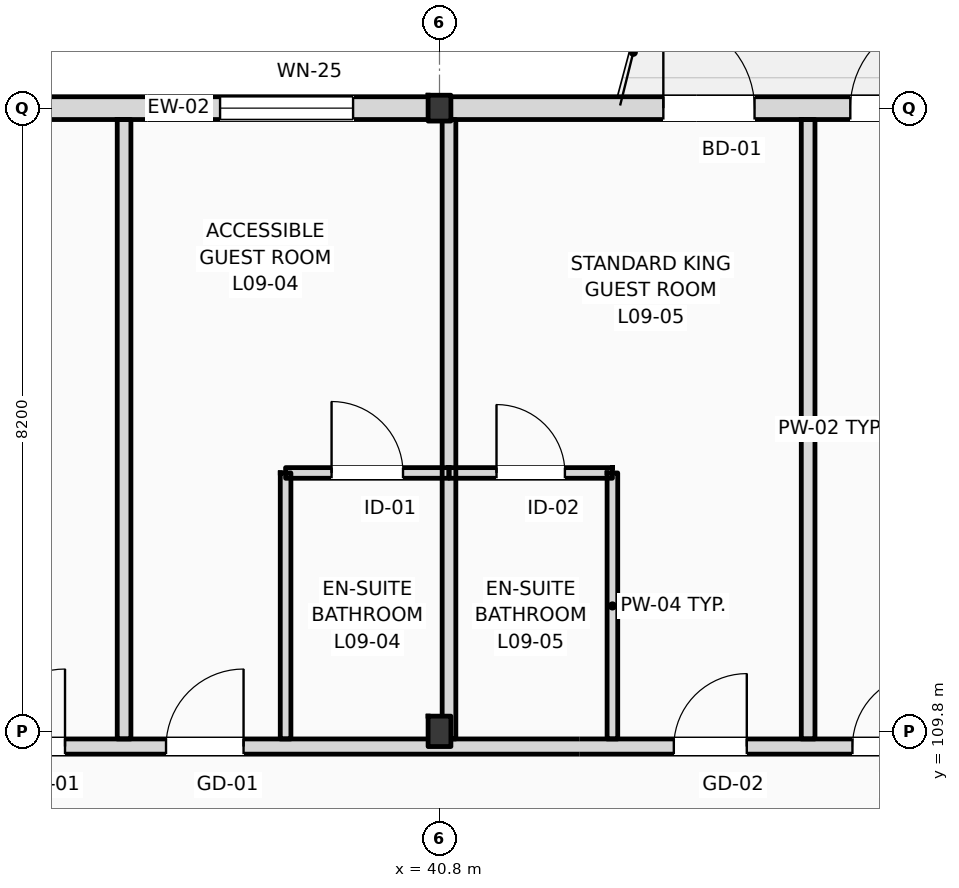
"""IFC4 building model, lengths in metres.
Left out: names, types, materials, properties, quantities, classifications, styles, units other than length and angle.
Written with IfcOpenShell. Run it as: python <this file> out.ifc"""

import sys

from ifc_helpers import new_model, si_unit, direction, frame, frame_2d, origin, origin_2d, place, context, subcontext, project, spatial, rectangle, i_section, extrude, element, fill, save


model = new_model("IFC4")
c1 = context("Model", 3, precision=1e-05, world=origin(), true_north=direction((0.0, 1.0)))
c2 = subcontext(c1, "Body", "Model", "MODEL_VIEW")
j1 = project(units=[si_unit("LENGTHUNIT", "METRE"), si_unit("PLANEANGLEUNIT", "RADIAN")], contexts=[c1])
p1 = place(None, origin())
s1 = spatial("IfcSite", under=j1, at=p1, CompositionType="ELEMENT")
p2 = place(p1, origin())
s2 = spatial("IfcBuilding", under=s1, at=p2, CompositionType="ELEMENT")
p3 = place(p2, frame((0.0, 0.0, 39.0)))
s3 = spatial("IfcBuildingStorey", under=s2, at=p3, CompositionType="ELEMENT", Elevation=39.0)
p4 = place(p3, frame((40.8, 109.8, 0.0), z_axis=(0.0, 0.0, 1.0), x_axis=(1.0, 0.0, 0.0)))
e1 = element("IfcColumn", 1, at=p4, inside=s3, PredefinedType="COLUMN", context=c2, shape_type="SweptSolid", body=[
    extrude(i_section(OverallWidth=0.3, OverallDepth=0.4, WebThickness=0.013, FlangeThickness=0.024, FilletRadius=0.027, at=origin_2d()), origin(), (0.0, 0.0, 1.0), 3.6),
])
p5 = place(p3, frame((40.8, 118.0, 0.0), z_axis=(0.0, 0.0, 1.0), x_axis=(1.0, 0.0, 0.0)))
e2 = element("IfcColumn", 2, at=p5, inside=s3, PredefinedType="COLUMN", context=c2, shape_type="SweptSolid", body=[
    extrude(i_section(OverallWidth=0.3, OverallDepth=0.34, WebThickness=0.012, FlangeThickness=0.021, FilletRadius=0.027, at=origin_2d()), origin(), (0.0, 0.0, 1.0), 3.6),
])
p6 = place(p3, frame((22.5, 118.0, 0.0), z_axis=(0.0, 0.0, 1.0), x_axis=(1.0, 0.0, 0.0)))
e3 = element("IfcWall", 3, at=p6, inside=s3, PredefinedType="STANDARD", context=c2, shape_type="SweptSolid", body=[
    extrude(rectangle(XDim=72.9, YDim=0.3, at=frame_2d((36.45, 0.0))), origin(), (0.0, 0.0, 1.0), 2.92),
])
p7 = place(p6, frame((3.6, 0.0, 0.9)))
e4 = element("IfcOpeningElement", 4, at=p7, cuts=e3, PredefinedType="OPENING", context=c2, shape_type="SweptSolid", body=[
    extrude(rectangle(XDim=1.1, YDim=1.6, at=frame_2d((0.55, 0.8))), frame((0.0, 0.16, 0.0), z_axis=(0.0, -1.0, 0.0), x_axis=(1.0, 0.0, 0.0)), (0.0, 0.0, 1.0), 0.32),
])
p8 = place(p6, frame((6.688, 0.0, 0.0)))
e5 = element("IfcOpeningElement", 5, at=p8, cuts=e3, PredefinedType="OPENING", context=c2, shape_type="SweptSolid", body=[
    extrude(rectangle(XDim=1.2, YDim=2.25, at=frame_2d((0.6, 1.125))), frame((0.0, 0.16, 0.0), z_axis=(0.0, -1.0, 0.0), x_axis=(1.0, 0.0, 0.0)), (0.0, 0.0, 1.0), 0.32),
])
p9 = place(p6, frame((11.388, 0.0, 0.9)))
e6 = element("IfcOpeningElement", 6, at=p9, cuts=e3, PredefinedType="OPENING", context=c2, shape_type="SweptSolid", body=[
    extrude(rectangle(XDim=1.6, YDim=1.75, at=frame_2d((0.8, 0.875))), frame((0.0, 0.16, 0.0), z_axis=(0.0, -1.0, 0.0), x_axis=(1.0, 0.0, 0.0)), (0.0, 0.0, 1.0), 0.32),
])
p10 = place(p6, frame((15.413, 0.0, 0.9)))
e7 = element("IfcOpeningElement", 7, at=p10, cuts=e3, PredefinedType="OPENING", context=c2, shape_type="SweptSolid", body=[
    extrude(rectangle(XDim=1.75, YDim=1.84, at=frame_2d((0.875, 0.92))), frame((0.0, 0.16, 0.0), z_axis=(0.0, -1.0, 0.0), x_axis=(1.0, 0.0, 0.0)), (0.0, 0.0, 1.0), 0.32),
])
p11 = place(p6, frame((21.245, 0.0, 0.0)))
e8 = element("IfcOpeningElement", 8, at=p11, cuts=e3, PredefinedType="OPENING", context=c2, shape_type="SweptSolid", body=[
    extrude(rectangle(XDim=1.2, YDim=2.25, at=frame_2d((0.6, 1.125))), frame((0.0, 0.16, 0.0), z_axis=(0.0, -1.0, 0.0), x_axis=(1.0, 0.0, 0.0)), (0.0, 0.0, 1.0), 0.32),
])
p12 = place(p6, frame((23.705, 0.0, 0.0)))
e9 = element("IfcOpeningElement", 9, at=p12, cuts=e3, PredefinedType="OPENING", context=c2, shape_type="SweptSolid", body=[
    extrude(rectangle(XDim=1.2, YDim=2.25, at=frame_2d((0.6, 1.125))), frame((0.0, 0.16, 0.0), z_axis=(0.0, -1.0, 0.0), x_axis=(1.0, 0.0, 0.0)), (0.0, 0.0, 1.0), 0.32),
])
p13 = place(p6, frame((28.488, 0.0, 0.9)))
e10 = element("IfcOpeningElement", 10, at=p13, cuts=e3, PredefinedType="OPENING", context=c2, shape_type="SweptSolid", body=[
    extrude(rectangle(XDim=2.6, YDim=1.84, at=frame_2d((1.3, 0.92))), frame((0.0, 0.16, 0.0), z_axis=(0.0, -1.0, 0.0), x_axis=(1.0, 0.0, 0.0)), (0.0, 0.0, 1.0), 0.32),
])
p14 = place(p6, frame((34.76, 0.0, 0.9)))
e11 = element("IfcOpeningElement", 11, at=p14, cuts=e3, PredefinedType="OPENING", context=c2, shape_type="SweptSolid", body=[
    extrude(rectangle(XDim=1.1, YDim=1.84, at=frame_2d((0.55, 0.92))), frame((0.0, 0.16, 0.0), z_axis=(0.0, -1.0, 0.0), x_axis=(1.0, 0.0, 0.0)), (0.0, 0.0, 1.0), 0.32),
])
p15 = place(p6, frame((38.143, 0.0, 0.0)))
e12 = element("IfcOpeningElement", 12, at=p15, cuts=e3, PredefinedType="OPENING", context=c2, shape_type="SweptSolid", body=[
    extrude(rectangle(XDim=1.2, YDim=2.25, at=frame_2d((0.6, 1.125))), frame((0.0, 0.16, 0.0), z_axis=(0.0, -1.0, 0.0), x_axis=(1.0, 0.0, 0.0)), (0.0, 0.0, 1.0), 0.32),
])
p16 = place(p6, frame((42.687, 0.0, 0.9)))
e13 = element("IfcOpeningElement", 13, at=p16, cuts=e3, PredefinedType="OPENING", context=c2, shape_type="SweptSolid", body=[
    extrude(rectangle(XDim=1.2, YDim=1.8, at=frame_2d((0.6, 0.9))), frame((0.0, 0.16, 0.0), z_axis=(0.0, -1.0, 0.0), x_axis=(1.0, 0.0, 0.0)), (0.0, 0.0, 1.0), 0.32),
])
p17 = place(p6, frame((47.112, 0.0, 0.9)))
e14 = element("IfcOpeningElement", 14, at=p17, cuts=e3, PredefinedType="OPENING", context=c2, shape_type="SweptSolid", body=[
    extrude(rectangle(XDim=1.35, YDim=1.84, at=frame_2d((0.675, 0.92))), frame((0.0, 0.16, 0.0), z_axis=(0.0, -1.0, 0.0), x_axis=(1.0, 0.0, 0.0)), (0.0, 0.0, 1.0), 0.32),
])
p18 = place(p6, frame((52.482, 0.0, 0.0)))
e15 = element("IfcOpeningElement", 15, at=p18, cuts=e3, PredefinedType="OPENING", context=c2, shape_type="SweptSolid", body=[
    extrude(rectangle(XDim=1.2, YDim=2.25, at=frame_2d((0.6, 1.125))), frame((0.0, 0.16, 0.0), z_axis=(0.0, -1.0, 0.0), x_axis=(1.0, 0.0, 0.0)), (0.0, 0.0, 1.0), 0.32),
])
p19 = place(p6, frame((54.942, 0.0, 0.0)))
e16 = element("IfcOpeningElement", 16, at=p19, cuts=e3, PredefinedType="OPENING", context=c2, shape_type="SweptSolid", body=[
    extrude(rectangle(XDim=1.2, YDim=2.25, at=frame_2d((0.6, 1.125))), frame((0.0, 0.16, 0.0), z_axis=(0.0, -1.0, 0.0), x_axis=(1.0, 0.0, 0.0)), (0.0, 0.0, 1.0), 0.32),
])
p20 = place(p6, frame((60.387, 0.0, 0.9)))
e17 = element("IfcOpeningElement", 17, at=p20, cuts=e3, PredefinedType="OPENING", context=c2, shape_type="SweptSolid", body=[
    extrude(rectangle(XDim=1.8, YDim=1.84, at=frame_2d((0.9, 0.92))), frame((0.0, 0.16, 0.0), z_axis=(0.0, -1.0, 0.0), x_axis=(1.0, 0.0, 0.0)), (0.0, 0.0, 1.0), 0.32),
])
p21 = place(p6, frame((66.013, 0.0, 0.9)))
e18 = element("IfcOpeningElement", 18, at=p21, cuts=e3, PredefinedType="OPENING", context=c2, shape_type="SweptSolid", body=[
    extrude(rectangle(XDim=1.35, YDim=1.84, at=frame_2d((0.675, 0.92))), frame((0.0, 0.16, 0.0), z_axis=(0.0, -1.0, 0.0), x_axis=(1.0, 0.0, 0.0)), (0.0, 0.0, 1.0), 0.32),
])
p22 = place(p6, frame((69.275, 0.0, 0.9)))
e19 = element("IfcOpeningElement", 19, at=p22, cuts=e3, PredefinedType="OPENING", context=c2, shape_type="SweptSolid", body=[
    extrude(rectangle(XDim=2.1, YDim=1.84, at=frame_2d((1.05, 0.92))), frame((0.0, 0.16, 0.0), z_axis=(0.0, -1.0, 0.0), x_axis=(1.0, 0.0, 0.0)), (0.0, 0.0, 1.0), 0.32),
])
p23 = place(p3, frame((10.65, 109.6, 0.0), z_axis=(0.0, 0.0, 1.0), x_axis=(1.0, 0.0, 0.0)))
e20 = element("IfcWall", 20, at=p23, inside=s3, PredefinedType="PARTITIONING", context=c2, shape_type="SweptSolid", body=[
    extrude(rectangle(XDim=84.61, YDim=0.2, at=frame_2d((42.305, 0.0))), origin(), (0.0, 0.0, 1.0), 2.82),
])
p24 = place(p23, frame((15.49, 0.0, 0.0)))
e21 = element("IfcOpeningElement", 21, at=p24, cuts=e20, PredefinedType="OPENING", context=c2, shape_type="SweptSolid", body=[
    extrude(rectangle(XDim=1.02, YDim=2.2, at=frame_2d((0.51, 1.1))), frame((0.0, 0.11, 0.0), z_axis=(0.0, -1.0, 0.0), x_axis=(1.0, 0.0, 0.0)), (0.0, 0.0, 1.0), 0.22),
])
p25 = place(p23, frame((19.703, 0.0, 0.0)))
e22 = element("IfcOpeningElement", 22, at=p25, cuts=e20, PredefinedType="OPENING", context=c2, shape_type="SweptSolid", body=[
    extrude(rectangle(XDim=1.02, YDim=2.2, at=frame_2d((0.51, 1.1))), frame((0.0, 0.11, 0.0), z_axis=(0.0, -1.0, 0.0), x_axis=(1.0, 0.0, 0.0)), (0.0, 0.0, 1.0), 0.22),
])
p26 = place(p23, frame((24.203, 0.0, 0.0)))
e23 = element("IfcOpeningElement", 23, at=p26, cuts=e20, PredefinedType="OPENING", context=c2, shape_type="SweptSolid", body=[
    extrude(rectangle(XDim=1.02, YDim=2.2, at=frame_2d((0.51, 1.1))), frame((0.0, 0.11, 0.0), z_axis=(0.0, -1.0, 0.0), x_axis=(1.0, 0.0, 0.0)), (0.0, 0.0, 1.0), 0.22),
])
p27 = place(p23, frame((26.552, 0.0, 0.0)))
e24 = element("IfcOpeningElement", 24, at=p27, cuts=e20, PredefinedType="OPENING", context=c2, shape_type="SweptSolid", body=[
    extrude(rectangle(XDim=1.02, YDim=2.2, at=frame_2d((0.51, 1.1))), frame((0.0, 0.11, 0.0), z_axis=(0.0, -1.0, 0.0), x_axis=(1.0, 0.0, 0.0)), (0.0, 0.0, 1.0), 0.22),
])
p28 = place(p23, frame((33.233, 0.0, 0.0)))
e25 = element("IfcOpeningElement", 25, at=p28, cuts=e20, PredefinedType="OPENING", context=c2, shape_type="SweptSolid", body=[
    extrude(rectangle(XDim=0.96, YDim=2.2, at=frame_2d((0.48, 1.1))), frame((0.0, 0.11, 0.0), z_axis=(0.0, -1.0, 0.0), x_axis=(1.0, 0.0, 0.0)), (0.0, 0.0, 1.0), 0.22),
])
p29 = place(p23, frame((35.583, 0.0, 0.0)))
e26 = element("IfcOpeningElement", 26, at=p29, cuts=e20, PredefinedType="OPENING", context=c2, shape_type="SweptSolid", body=[
    extrude(rectangle(XDim=0.96, YDim=2.2, at=frame_2d((0.48, 1.1))), frame((0.0, 0.11, 0.0), z_axis=(0.0, -1.0, 0.0), x_axis=(1.0, 0.0, 0.0)), (0.0, 0.0, 1.0), 0.22),
])
p30 = place(p23, frame((42.233, 0.0, 0.0)))
e27 = element("IfcOpeningElement", 27, at=p30, cuts=e20, PredefinedType="OPENING", context=c2, shape_type="SweptSolid", body=[
    extrude(rectangle(XDim=0.96, YDim=2.2, at=frame_2d((0.48, 1.1))), frame((0.0, 0.11, 0.0), z_axis=(0.0, -1.0, 0.0), x_axis=(1.0, 0.0, 0.0)), (0.0, 0.0, 1.0), 0.22),
])
p31 = place(p23, frame((46.983, 0.0, 0.0)))
e28 = element("IfcOpeningElement", 28, at=p31, cuts=e20, PredefinedType="OPENING", context=c2, shape_type="SweptSolid", body=[
    extrude(rectangle(XDim=0.96, YDim=2.2, at=frame_2d((0.48, 1.1))), frame((0.0, 0.11, 0.0), z_axis=(0.0, -1.0, 0.0), x_axis=(1.0, 0.0, 0.0)), (0.0, 0.0, 1.0), 0.22),
])
p32 = place(p23, frame((51.233, 0.0, 0.0)))
e29 = element("IfcOpeningElement", 29, at=p32, cuts=e20, PredefinedType="OPENING", context=c2, shape_type="SweptSolid", body=[
    extrude(rectangle(XDim=0.96, YDim=2.2, at=frame_2d((0.48, 1.1))), frame((0.0, 0.11, 0.0), z_axis=(0.0, -1.0, 0.0), x_axis=(1.0, 0.0, 0.0)), (0.0, 0.0, 1.0), 0.22),
])
p33 = place(p23, frame((55.733, 0.0, 0.0)))
e30 = element("IfcOpeningElement", 30, at=p33, cuts=e20, PredefinedType="OPENING", context=c2, shape_type="SweptSolid", body=[
    extrude(rectangle(XDim=0.96, YDim=2.2, at=frame_2d((0.48, 1.1))), frame((0.0, 0.11, 0.0), z_axis=(0.0, -1.0, 0.0), x_axis=(1.0, 0.0, 0.0)), (0.0, 0.0, 1.0), 0.22),
])
p34 = place(p23, frame((58.083, 0.0, 0.0)))
e31 = element("IfcOpeningElement", 31, at=p34, cuts=e20, PredefinedType="OPENING", context=c2, shape_type="SweptSolid", body=[
    extrude(rectangle(XDim=0.96, YDim=2.2, at=frame_2d((0.48, 1.1))), frame((0.0, 0.11, 0.0), z_axis=(0.0, -1.0, 0.0), x_axis=(1.0, 0.0, 0.0)), (0.0, 0.0, 1.0), 0.22),
])
p35 = place(p23, frame((64.732, 0.0, 0.0)))
e32 = element("IfcOpeningElement", 32, at=p35, cuts=e20, PredefinedType="OPENING", context=c2, shape_type="SweptSolid", body=[
    extrude(rectangle(XDim=0.96, YDim=2.2, at=frame_2d((0.48, 1.1))), frame((0.0, 0.11, 0.0), z_axis=(0.0, -1.0, 0.0), x_axis=(1.0, 0.0, 0.0)), (0.0, 0.0, 1.0), 0.22),
])
p36 = place(p23, frame((66.832, 0.0, 0.0)))
e33 = element("IfcOpeningElement", 33, at=p36, cuts=e20, PredefinedType="OPENING", context=c2, shape_type="SweptSolid", body=[
    extrude(rectangle(XDim=0.96, YDim=2.2, at=frame_2d((0.48, 1.1))), frame((0.0, 0.11, 0.0), z_axis=(0.0, -1.0, 0.0), x_axis=(1.0, 0.0, 0.0)), (0.0, 0.0, 1.0), 0.22),
])
p37 = place(p23, frame((73.732, 0.0, 0.0)))
e34 = element("IfcOpeningElement", 34, at=p37, cuts=e20, PredefinedType="OPENING", context=c2, shape_type="SweptSolid", body=[
    extrude(rectangle(XDim=0.96, YDim=2.2, at=frame_2d((0.48, 1.1))), frame((0.0, 0.11, 0.0), z_axis=(0.0, -1.0, 0.0), x_axis=(1.0, 0.0, 0.0)), (0.0, 0.0, 1.0), 0.22),
])
p38 = place(p23, frame((78.233, 0.0, 0.0)))
e35 = element("IfcOpeningElement", 35, at=p38, cuts=e20, PredefinedType="OPENING", context=c2, shape_type="SweptSolid", body=[
    extrude(rectangle(XDim=0.96, YDim=2.2, at=frame_2d((0.48, 1.1))), frame((0.0, 0.11, 0.0), z_axis=(0.0, -1.0, 0.0), x_axis=(1.0, 0.0, 0.0)), (0.0, 0.0, 1.0), 0.22),
])
p39 = place(p23, frame((80.62, 0.0, 0.0)))
e36 = element("IfcOpeningElement", 36, at=p39, cuts=e20, PredefinedType="OPENING", context=c2, shape_type="SweptSolid", body=[
    extrude(rectangle(XDim=0.96, YDim=2.2, at=frame_2d((0.48, 1.1))), frame((0.0, 0.11, 0.0), z_axis=(0.0, -1.0, 0.0), x_axis=(1.0, 0.0, 0.0)), (0.0, 0.0, 1.0), 0.22),
])
p40 = place(p23, frame((2.716, 0.0, 0.0)))
e37 = element("IfcOpeningElement", 37, at=p40, cuts=e20, PredefinedType="OPENING", context=c2, shape_type="SweptSolid", body=[
    extrude(rectangle(XDim=1.35, YDim=2.25, at=frame_2d((0.675, 1.125))), frame((0.0, 0.11, 0.0), z_axis=(0.0, -1.0, 0.0), x_axis=(1.0, 0.0, 0.0)), (0.0, 0.0, 1.0), 0.22),
])
p41 = place(p23, frame((6.65, 0.0, 0.0)))
e38 = element("IfcOpeningElement", 38, at=p41, cuts=e20, PredefinedType="OPENING", context=c2, shape_type="SweptSolid", body=[
    extrude(rectangle(XDim=1.35, YDim=2.25, at=frame_2d((0.675, 1.125))), frame((0.0, 0.11, 0.0), z_axis=(0.0, -1.0, 0.0), x_axis=(1.0, 0.0, 0.0)), (0.0, 0.0, 1.0), 0.22),
])
p42 = place(p23, frame((10.583, 0.0, 0.0)))
e39 = element("IfcOpeningElement", 39, at=p42, cuts=e20, PredefinedType="OPENING", context=c2, shape_type="SweptSolid", body=[
    extrude(rectangle(XDim=1.35, YDim=2.25, at=frame_2d((0.675, 1.125))), frame((0.0, 0.11, 0.0), z_axis=(0.0, -1.0, 0.0), x_axis=(1.0, 0.0, 0.0)), (0.0, 0.0, 1.0), 0.22),
])
p43 = place(p3, frame((36.65, 109.7, 0.0), z_axis=(0.0, 0.0, 1.0), x_axis=(0.0, 1.0, 0.0)))
e40 = element("IfcWall", 40, at=p43, inside=s3, PredefinedType="PARTITIONING", context=c2, shape_type="SweptSolid", body=[
    extrude(rectangle(XDim=8.15, YDim=0.18, at=frame_2d((4.075, 0.0))), origin(), (0.0, 0.0, 1.0), 3.38),
])
p44 = place(p3, frame((40.925, 109.7, 0.0), z_axis=(0.0, 0.0, 1.0), x_axis=(0.0, 1.0, 0.0)))
e41 = element("IfcWall", 41, at=p44, inside=s3, PredefinedType="PARTITIONING", context=c2, shape_type="SweptSolid", body=[
    extrude(rectangle(XDim=8.15, YDim=0.18, at=frame_2d((4.075, 0.0))), origin(), (0.0, 0.0, 1.0), 3.01),
])
p45 = place(p3, frame((38.775, 109.7, 0.0), z_axis=(0.0, 0.0, 1.0), x_axis=(0.0, 1.0, 0.0)))
e42 = element("IfcWall", 42, at=p45, inside=s3, PredefinedType="PARTITIONING", context=c2, shape_type="SweptSolid", body=[
    extrude(rectangle(XDim=3.5, YDim=0.14, at=frame_2d((1.75, 0.0))), origin(), (0.0, 0.0, 1.0), 3.38),
])
p46 = place(p3, frame((38.775, 113.2, 0.0), z_axis=(0.0, 0.0, 1.0), x_axis=(1.0, 0.0, 0.0)))
e43 = element("IfcWall", 43, at=p46, inside=s3, PredefinedType="PARTITIONING", context=c2, shape_type="SweptSolid", body=[
    extrude(rectangle(XDim=2.15, YDim=0.14, at=frame_2d((1.075, 0.0))), origin(), (0.0, 0.0, 1.0), 3.38),
])
p47 = place(p46, frame((0.605, 0.0, 0.0)))
e44 = element("IfcOpeningElement", 44, at=p47, cuts=e43, PredefinedType="OPENING", context=c2, shape_type="SweptSolid", body=[
    extrude(rectangle(XDim=0.94, YDim=2.15, at=frame_2d((0.47, 1.075))), frame((0.0, 0.08, 0.0), z_axis=(0.0, -1.0, 0.0), x_axis=(1.0, 0.0, 0.0)), (0.0, 0.0, 1.0), 0.16),
])
p48 = place(p3, frame((45.65, 109.7, 0.0), z_axis=(0.0, 0.0, 1.0), x_axis=(0.0, 1.0, 0.0)))
e45 = element("IfcWall", 45, at=p48, inside=s3, PredefinedType="PARTITIONING", context=c2, shape_type="SweptSolid", body=[
    extrude(rectangle(XDim=8.15, YDim=0.18, at=frame_2d((4.075, 0.0))), origin(), (0.0, 0.0, 1.0), 3.38),
])
p49 = place(p3, frame((43.075, 109.7, 0.0), z_axis=(0.0, 0.0, 1.0), x_axis=(0.0, 1.0, 0.0)))
e46 = element("IfcWall", 46, at=p49, inside=s3, PredefinedType="PARTITIONING", context=c2, shape_type="SweptSolid", body=[
    extrude(rectangle(XDim=3.5, YDim=0.14, at=frame_2d((1.75, 0.0))), origin(), (0.0, 0.0, 1.0), 3.38),
])
p50 = place(p3, frame((40.925, 113.2, 0.0), z_axis=(0.0, 0.0, 1.0), x_axis=(1.0, 0.0, 0.0)))
e47 = element("IfcWall", 47, at=p50, inside=s3, PredefinedType="PARTITIONING", context=c2, shape_type="SweptSolid", body=[
    extrude(rectangle(XDim=2.15, YDim=0.14, at=frame_2d((1.075, 0.0))), origin(), (0.0, 0.0, 1.0), 3.38),
])
p51 = place(p50, frame((0.625, 0.0, 0.0)))
e48 = element("IfcOpeningElement", 48, at=p51, cuts=e47, PredefinedType="OPENING", context=c2, shape_type="SweptSolid", body=[
    extrude(rectangle(XDim=0.9, YDim=2.1, at=frame_2d((0.45, 1.05))), frame((0.0, 0.08, 0.0), z_axis=(0.0, -1.0, 0.0), x_axis=(1.0, 0.0, 0.0)), (0.0, 0.0, 1.0), 0.16),
])
p52 = place(p10, origin())
e49 = element("IfcWindow", 49, at=p52, inside=s3, PartitioningType="DOUBLE_PANEL_VERTICAL", PredefinedType="WINDOW", context=c2, shape_type="SweptSolid", body=[
    extrude(rectangle(XDim=1.75, YDim=1.84, at=frame_2d((0.875, 0.92))), frame((0.0, 0.03, 0.0), z_axis=(0.0, -1.0, 0.0), x_axis=(1.0, 0.0, 0.0)), (0.0, 0.0, 1.0), 0.06),
])
fill(e7, e49)
p53 = place(p11, origin())
e50 = element("IfcDoor", 50, at=p53, inside=s3, OperationType="SINGLE_SWING_LEFT", PredefinedType="DOOR", context=c2, shape_type="SweptSolid", body=[
    extrude(rectangle(XDim=1.2, YDim=2.25, at=frame_2d((0.6, 1.125))), frame((0.0, 0.025, 0.0), z_axis=(0.0, -1.0, 0.0), x_axis=(1.0, 0.0, 0.0)), (0.0, 0.0, 1.0), 0.05),
])
fill(e8, e50)
p54 = place(p12, origin())
e51 = element("IfcDoor", 51, at=p54, inside=s3, OperationType="SINGLE_SWING_RIGHT", PredefinedType="DOOR", context=c2, shape_type="SweptSolid", body=[
    extrude(rectangle(XDim=1.2, YDim=2.25, at=frame_2d((0.6, 1.125))), frame((0.0, 0.025, 0.0), z_axis=(0.0, -1.0, 0.0), x_axis=(1.0, 0.0, 0.0)), (0.0, 0.0, 1.0), 0.05),
])
fill(e9, e51)
p55 = place(p26, origin())
e52 = element("IfcDoor", 52, at=p55, inside=s3, OperationType="SINGLE_SWING_RIGHT", PredefinedType="DOOR", context=c2, shape_type="SweptSolid", body=[
    extrude(rectangle(XDim=1.02, YDim=2.2, at=frame_2d((0.51, 1.1))), frame((0.0, 0.025, 0.0), z_axis=(0.0, -1.0, 0.0), x_axis=(1.0, 0.0, 0.0)), (0.0, 0.0, 1.0), 0.05),
])
fill(e23, e52)
p56 = place(p27, origin())
e53 = element("IfcDoor", 53, at=p56, inside=s3, OperationType="SINGLE_SWING_RIGHT", PredefinedType="DOOR", context=c2, shape_type="SweptSolid", body=[
    extrude(rectangle(XDim=1.02, YDim=2.2, at=frame_2d((0.51, 1.1))), frame((0.0, 0.025, 0.0), z_axis=(0.0, -1.0, 0.0), x_axis=(1.0, 0.0, 0.0)), (0.0, 0.0, 1.0), 0.05),
])
fill(e24, e53)
p57 = place(p47, origin())
e54 = element("IfcDoor", 54, at=p57, inside=s3, OperationType="SINGLE_SWING_LEFT", PredefinedType="DOOR", context=c2, shape_type="SweptSolid", body=[
    extrude(rectangle(XDim=0.94, YDim=2.15, at=frame_2d((0.47, 1.075))), frame((0.0, 0.025, 0.0), z_axis=(0.0, -1.0, 0.0), x_axis=(1.0, 0.0, 0.0)), (0.0, 0.0, 1.0), 0.05),
])
fill(e44, e54)
p58 = place(p28, origin())
e55 = element("IfcDoor", 55, at=p58, inside=s3, OperationType="SINGLE_SWING_RIGHT", PredefinedType="DOOR", context=c2, shape_type="SweptSolid", body=[
    extrude(rectangle(XDim=0.96, YDim=2.2, at=frame_2d((0.48, 1.1))), frame((0.0, 0.025, 0.0), z_axis=(0.0, -1.0, 0.0), x_axis=(1.0, 0.0, 0.0)), (0.0, 0.0, 1.0), 0.05),
])
fill(e25, e55)
p59 = place(p51, origin())
e56 = element("IfcDoor", 56, at=p59, inside=s3, OperationType="SINGLE_SWING_LEFT", PredefinedType="DOOR", context=c2, shape_type="SweptSolid", body=[
    extrude(rectangle(XDim=0.9, YDim=2.1, at=frame_2d((0.45, 1.05))), frame((0.0, 0.025, 0.0), z_axis=(0.0, -1.0, 0.0), x_axis=(1.0, 0.0, 0.0)), (0.0, 0.0, 1.0), 0.05),
])
fill(e48, e56)
p60 = place(p29, origin())
e57 = element("IfcDoor", 57, at=p60, inside=s3, OperationType="SINGLE_SWING_RIGHT", PredefinedType="DOOR", context=c2, shape_type="SweptSolid", body=[
    extrude(rectangle(XDim=0.96, YDim=2.2, at=frame_2d((0.48, 1.1))), frame((0.0, 0.025, 0.0), z_axis=(0.0, -1.0, 0.0), x_axis=(1.0, 0.0, 0.0)), (0.0, 0.0, 1.0), 0.05),
])
fill(e26, e57)
save(model, sys.argv[1])
